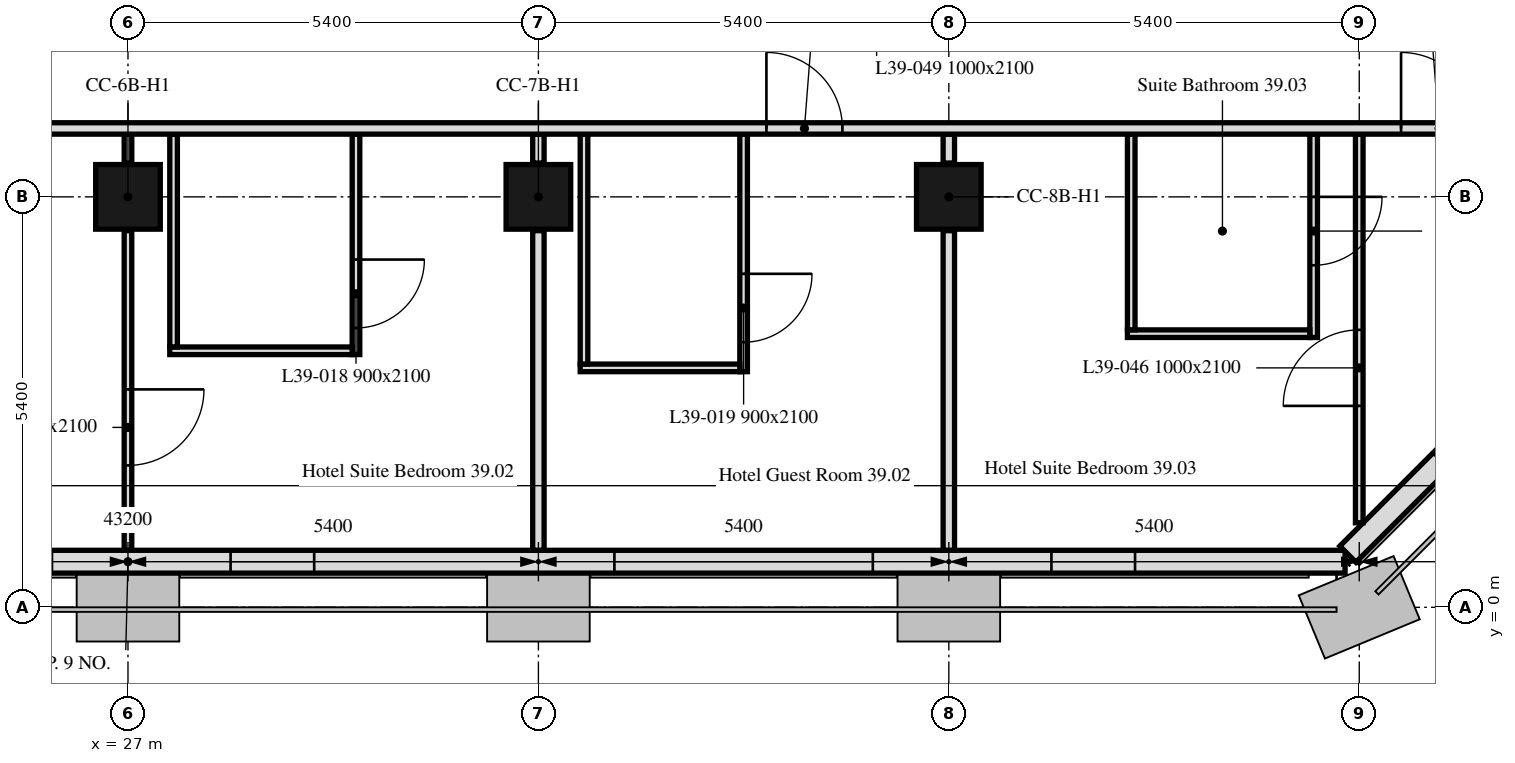
"""IFC4 building model, lengths in metres.
Left out: names, types, materials, properties, quantities, classifications, styles, units other than length and angle.
Written with IfcOpenShell. Run it as: python <this file> out.ifc"""

import sys

from ifc_helpers import new_model, si_unit, direction, frame, frame_2d, origin, origin_2d, place, context, subcontext, project, spatial, rectangle, extrude, element, fill, save


model = new_model("IFC4")
c1 = context("Model", 3, precision=1e-05, world=origin(), true_north=direction((0.0, 1.0)))
c2 = subcontext(c1, "Body", "Model", "MODEL_VIEW")
j1 = project(units=[si_unit("LENGTHUNIT", "METRE"), si_unit("PLANEANGLEUNIT", "RADIAN")], contexts=[c1])
p1 = place(None, origin())
s1 = spatial("IfcSite", under=j1, at=p1, CompositionType="ELEMENT")
p2 = place(p1, origin())
s2 = spatial("IfcBuilding", under=s1, at=p2, CompositionType="ELEMENT")
p3 = place(p2, frame((0.0, 0.0, 166.0)))
s3 = spatial("IfcBuildingStorey", under=s2, at=p3, CompositionType="ELEMENT", Elevation=166.0)
for number, where, z_axis, x_axis in (
    (1, (27.0, 5.4, 0.0), (0.0, 0.0, 1.0), (1.0, 0.0, 0.0)),
    (2, (32.4, 5.4, 0.0), (0.0, 0.0, 1.0), (1.0, 0.0, 0.0)),
    (3, (37.8, 5.4, 0.0), (0.0, 0.0, 1.0), (1.0, 0.0, 0.0)),
):
    element("IfcColumn", number, at=place(p3, frame(where, z_axis=z_axis, x_axis=x_axis)), inside=s3, PredefinedType="COLUMN", context=c2, shape_type="SweptSolid", body=[
        extrude(rectangle(XDim=0.85, YDim=0.85, at=origin_2d()), origin(), (0.0, 0.0, 1.0), 3.0),
    ])
p4 = place(p3, frame((10.986, 0.6, 0.0), z_axis=(0.0, 0.0, 1.0), x_axis=(1.0, 0.0, 0.0)))
e4 = element("IfcWall", 4, at=p4, inside=s3, PredefinedType="SOLIDWALL", context=c2, shape_type="SweptSolid", body=[
    extrude(rectangle(XDim=32.027, YDim=0.3, at=frame_2d((16.014, 0.0))), origin(), (0.0, 0.0, 1.0), 3.0),
])
p5 = place(p4, frame((0.814, 0.0, 0.9)))
e5 = element("IfcOpeningElement", 5, at=p5, cuts=e4, PredefinedType="OPENING", context=c2, shape_type="SweptSolid", body=[
    extrude(rectangle(XDim=3.4, YDim=1.7, at=frame_2d((1.7, 0.85))), frame((0.0, 0.16, 0.0), z_axis=(0.0, -1.0, 0.0), x_axis=(1.0, 0.0, 0.0)), (0.0, 0.0, 1.0), 0.32),
])
p6 = place(p4, frame((6.564, 0.0, 0.9)))
e6 = element("IfcOpeningElement", 6, at=p6, cuts=e4, PredefinedType="OPENING", context=c2, shape_type="SweptSolid", body=[
    extrude(rectangle(XDim=1.1, YDim=1.7, at=frame_2d((0.55, 0.85))), frame((0.0, 0.16, 0.0), z_axis=(0.0, -1.0, 0.0), x_axis=(1.0, 0.0, 0.0)), (0.0, 0.0, 1.0), 0.32),
])
p7 = place(p4, frame((11.614, 0.0, 0.9)))
e7 = element("IfcOpeningElement", 7, at=p7, cuts=e4, PredefinedType="OPENING", context=c2, shape_type="SweptSolid", body=[
    extrude(rectangle(XDim=3.4, YDim=1.7, at=frame_2d((1.7, 0.85))), frame((0.0, 0.16, 0.0), z_axis=(0.0, -1.0, 0.0), x_axis=(1.0, 0.0, 0.0)), (0.0, 0.0, 1.0), 0.32),
])
p8 = place(p4, frame((17.364, 0.0, 0.9)))
e8 = element("IfcOpeningElement", 8, at=p8, cuts=e4, PredefinedType="OPENING", context=c2, shape_type="SweptSolid", body=[
    extrude(rectangle(XDim=1.1, YDim=1.7, at=frame_2d((0.55, 0.85))), frame((0.0, 0.16, 0.0), z_axis=(0.0, -1.0, 0.0), x_axis=(1.0, 0.0, 0.0)), (0.0, 0.0, 1.0), 0.32),
])
p9 = place(p4, frame((22.414, 0.0, 0.9)))
e9 = element("IfcOpeningElement", 9, at=p9, cuts=e4, PredefinedType="OPENING", context=c2, shape_type="SweptSolid", body=[
    extrude(rectangle(XDim=3.4, YDim=1.7, at=frame_2d((1.7, 0.85))), frame((0.0, 0.16, 0.0), z_axis=(0.0, -1.0, 0.0), x_axis=(1.0, 0.0, 0.0)), (0.0, 0.0, 1.0), 0.32),
])
p10 = place(p4, frame((28.164, 0.0, 0.9)))
e10 = element("IfcOpeningElement", 10, at=p10, cuts=e4, PredefinedType="OPENING", context=c2, shape_type="SweptSolid", body=[
    extrude(rectangle(XDim=1.1, YDim=1.7, at=frame_2d((0.55, 0.85))), frame((0.0, 0.16, 0.0), z_axis=(0.0, -1.0, 0.0), x_axis=(1.0, 0.0, 0.0)), (0.0, 0.0, 1.0), 0.32),
])
p11 = place(p3, frame((43.051, 0.699, 0.0), z_axis=(0.0, 0.0, 1.0), x_axis=(0.707106781187, 0.707106781187, 0.0)))
e11 = element("IfcWall", 11, at=p11, inside=s3, PredefinedType="SOLIDWALL", context=c2, shape_type="SweptSolid", body=[
    extrude(rectangle(XDim=6.86, YDim=0.3, at=frame_2d((3.43, 0.0))), origin(), (0.0, 0.0, 1.0), 3.0),
])
p12 = place(p11, frame((1.73, 0.0, 0.9)))
e12 = element("IfcOpeningElement", 12, at=p12, cuts=e11, PredefinedType="OPENING", context=c2, shape_type="SweptSolid", body=[
    extrude(rectangle(XDim=3.4, YDim=1.7, at=frame_2d((1.7, 0.85))), frame((0.0, 0.16, 0.0), z_axis=(0.0, -1.0, 0.0), x_axis=(1.0, 0.0, 0.0)), (0.0, 0.0, 1.0), 0.32),
])
p13 = place(p3, frame((32.4, 0.751, 0.0), z_axis=(0.0, 0.0, 1.0), x_axis=(0.0, 1.0, 0.0)))
e13 = element("IfcWall", 13, at=p13, inside=s3, PredefinedType="PARTITIONING", context=c2, shape_type="SweptSolid", body=[
    extrude(rectangle(XDim=4.204, YDim=0.15, at=frame_2d((2.102, 0.0))), origin(), (0.0, 0.0, 1.0), 2.4),
])
p14 = place(p3, frame((32.4, 5.845, 0.0), z_axis=(0.0, 0.0, 1.0), x_axis=(0.0, 1.0, 0.0)))
e14 = element("IfcWall", 14, at=p14, inside=s3, PredefinedType="PARTITIONING", context=c2, shape_type="SweptSolid", body=[
    extrude(rectangle(XDim=0.38, YDim=0.15, at=frame_2d((0.19, 0.0))), origin(), (0.0, 0.0, 1.0), 2.4),
])
p15 = place(p3, frame((30.0, 6.225, 0.0), z_axis=(0.0, 0.0, 1.0), x_axis=(0.0, -1.0, 0.0)))
e15 = element("IfcWall", 15, at=p15, inside=s3, PredefinedType="PARTITIONING", context=c2, shape_type="SweptSolid", body=[
    extrude(rectangle(XDim=2.9, YDim=0.1, at=frame_2d((1.45, 0.0))), origin(), (0.0, 0.0, 1.0), 3.0),
])
p16 = place(p15, frame((1.65, 0.0, 0.0)))
e16 = element("IfcOpeningElement", 16, at=p16, cuts=e15, PredefinedType="OPENING", context=c2, shape_type="SweptSolid", body=[
    extrude(rectangle(XDim=0.9, YDim=2.1, at=frame_2d((0.45, 1.05))), frame((0.0, 0.05, 0.0), z_axis=(0.0, -1.0, 0.0), x_axis=(1.0, 0.0, 0.0)), (0.0, 0.0, 1.0), 0.1),
])
p17 = place(p3, frame((29.95, 3.375, 0.0), z_axis=(0.0, 0.0, 1.0), x_axis=(-1.0, 0.0, 0.0)))
e17 = element("IfcWall", 17, at=p17, inside=s3, PredefinedType="PARTITIONING", context=c2, shape_type="SweptSolid", body=[
    extrude(rectangle(XDim=2.4, YDim=0.1, at=frame_2d((1.2, 0.0))), origin(), (0.0, 0.0, 1.0), 3.0),
])
p18 = place(p3, frame((27.6, 3.425, 0.0), z_axis=(0.0, 0.0, 1.0), x_axis=(0.0, 1.0, 0.0)))
e18 = element("IfcWall", 18, at=p18, inside=s3, PredefinedType="PARTITIONING", context=c2, shape_type="SweptSolid", body=[
    extrude(rectangle(XDim=2.8, YDim=0.1, at=frame_2d((1.4, 0.0))), origin(), (0.0, 0.0, 1.0), 3.0),
])
p19 = place(p3, frame((27.0, 6.225, 0.0), z_axis=(0.0, 0.0, 1.0), x_axis=(0.0, -1.0, 0.0)))
e19 = element("IfcWall", 19, at=p19, inside=s3, PredefinedType="PARTITIONING", context=c2, shape_type="SweptSolid", body=[
    extrude(rectangle(XDim=0.38, YDim=0.1, at=frame_2d((0.19, 0.0))), origin(), (0.0, 0.0, 1.0), 2.4),
])
p20 = place(p3, frame((27.0, 4.955, 0.0), z_axis=(0.0, 0.0, 1.0), x_axis=(0.0, -1.0, 0.0)))
e20 = element("IfcWall", 20, at=p20, inside=s3, PredefinedType="PARTITIONING", context=c2, shape_type="SweptSolid", body=[
    extrude(rectangle(XDim=4.204, YDim=0.1, at=frame_2d((2.102, 0.0))), origin(), (0.0, 0.0, 1.0), 2.4),
])
p21 = place(p20, frame((2.088, 0.0, 0.0)))
e21 = element("IfcOpeningElement", 21, at=p21, cuts=e20, PredefinedType="OPENING", context=c2, shape_type="SweptSolid", body=[
    extrude(rectangle(XDim=1.0, YDim=2.1, at=frame_2d((0.5, 1.05))), frame((0.0, 0.05, 0.0), z_axis=(0.0, -1.0, 0.0), x_axis=(1.0, 0.0, 0.0)), (0.0, 0.0, 1.0), 0.1),
])
p22 = place(p3, frame((37.8, 0.751, 0.0), z_axis=(0.0, 0.0, 1.0), x_axis=(0.0, 1.0, 0.0)))
e22 = element("IfcWall", 22, at=p22, inside=s3, PredefinedType="PARTITIONING", context=c2, shape_type="SweptSolid", body=[
    extrude(rectangle(XDim=4.204, YDim=0.15, at=frame_2d((2.102, 0.0))), origin(), (0.0, 0.0, 1.0), 2.4),
])
p23 = place(p3, frame((37.8, 5.845, 0.0), z_axis=(0.0, 0.0, 1.0), x_axis=(0.0, 1.0, 0.0)))
e23 = element("IfcWall", 23, at=p23, inside=s3, PredefinedType="PARTITIONING", context=c2, shape_type="SweptSolid", body=[
    extrude(rectangle(XDim=0.38, YDim=0.15, at=frame_2d((0.19, 0.0))), origin(), (0.0, 0.0, 1.0), 2.4),
])
p24 = place(p3, frame((35.1, 6.225, 0.0), z_axis=(0.0, 0.0, 1.0), x_axis=(0.0, -1.0, 0.0)))
e24 = element("IfcWall", 24, at=p24, inside=s3, PredefinedType="PARTITIONING", context=c2, shape_type="SweptSolid", body=[
    extrude(rectangle(XDim=3.125, YDim=0.1, at=frame_2d((1.562, 0.0))), origin(), (0.0, 0.0, 1.0), 3.0),
])
p25 = place(p24, frame((1.837, 0.0, 0.0)))
e25 = element("IfcOpeningElement", 25, at=p25, cuts=e24, PredefinedType="OPENING", context=c2, shape_type="SweptSolid", body=[
    extrude(rectangle(XDim=0.9, YDim=2.1, at=frame_2d((0.45, 1.05))), frame((0.0, 0.05, 0.0), z_axis=(0.0, -1.0, 0.0), x_axis=(1.0, 0.0, 0.0)), (0.0, 0.0, 1.0), 0.1),
])
p26 = place(p3, frame((35.05, 3.15, 0.0), z_axis=(0.0, 0.0, 1.0), x_axis=(-1.0, 0.0, 0.0)))
e26 = element("IfcWall", 26, at=p26, inside=s3, PredefinedType="PARTITIONING", context=c2, shape_type="SweptSolid", body=[
    extrude(rectangle(XDim=2.1, YDim=0.1, at=frame_2d((1.05, 0.0))), origin(), (0.0, 0.0, 1.0), 3.0),
])
p27 = place(p3, frame((33.0, 3.2, 0.0), z_axis=(0.0, 0.0, 1.0), x_axis=(0.0, 1.0, 0.0)))
e27 = element("IfcWall", 27, at=p27, inside=s3, PredefinedType="PARTITIONING", context=c2, shape_type="SweptSolid", body=[
    extrude(rectangle(XDim=3.025, YDim=0.1, at=frame_2d((1.513, 0.0))), origin(), (0.0, 0.0, 1.0), 3.0),
])
p28 = place(p3, frame((43.2, 1.112, 0.0), z_axis=(0.0, 0.0, 1.0), x_axis=(0.0, 1.0, 0.0)))
e28 = element("IfcWall", 28, at=p28, inside=s3, PredefinedType="PARTITIONING", context=c2, shape_type="SweptSolid", body=[
    extrude(rectangle(XDim=5.113, YDim=0.1, at=frame_2d((2.557, 0.0))), origin(), (0.0, 0.0, 1.0), 3.0),
])
p29 = place(p28, frame((1.538, 0.0, 0.0)))
e29 = element("IfcOpeningElement", 29, at=p29, cuts=e28, PredefinedType="OPENING", context=c2, shape_type="SweptSolid", body=[
    extrude(rectangle(XDim=1.0, YDim=2.1, at=frame_2d((0.5, 1.05))), frame((0.0, 0.05, 0.0), z_axis=(0.0, -1.0, 0.0), x_axis=(1.0, 0.0, 0.0)), (0.0, 0.0, 1.0), 0.1),
])
p30 = place(p3, frame((42.6, 6.225, 0.0), z_axis=(0.0, 0.0, 1.0), x_axis=(0.0, -1.0, 0.0)))
e30 = element("IfcWall", 30, at=p30, inside=s3, PredefinedType="PARTITIONING", context=c2, shape_type="SweptSolid", body=[
    extrude(rectangle(XDim=2.675, YDim=0.1, at=frame_2d((1.337, 0.0))), origin(), (0.0, 0.0, 1.0), 3.0),
])
p31 = place(p30, frame((0.825, 0.0, 0.0)))
e31 = element("IfcOpeningElement", 31, at=p31, cuts=e30, PredefinedType="OPENING", context=c2, shape_type="SweptSolid", body=[
    extrude(rectangle(XDim=0.9, YDim=2.1, at=frame_2d((0.45, 1.05))), frame((0.0, 0.05, 0.0), z_axis=(0.0, -1.0, 0.0), x_axis=(1.0, 0.0, 0.0)), (0.0, 0.0, 1.0), 0.1),
])
p32 = place(p3, frame((42.55, 3.6, 0.0), z_axis=(0.0, 0.0, 1.0), x_axis=(-1.0, 0.0, 0.0)))
e32 = element("IfcWall", 32, at=p32, inside=s3, PredefinedType="PARTITIONING", context=c2, shape_type="SweptSolid", body=[
    extrude(rectangle(XDim=2.4, YDim=0.1, at=frame_2d((1.2, 0.0))), origin(), (0.0, 0.0, 1.0), 3.0),
])
p33 = place(p3, frame((40.2, 3.65, 0.0), z_axis=(0.0, 0.0, 1.0), x_axis=(0.0, 1.0, 0.0)))
e33 = element("IfcWall", 33, at=p33, inside=s3, PredefinedType="PARTITIONING", context=c2, shape_type="SweptSolid", body=[
    extrude(rectangle(XDim=2.575, YDim=0.1, at=frame_2d((1.288, 0.0))), origin(), (0.0, 0.0, 1.0), 3.0),
])
p34 = place(p3, frame((6.151, 6.3, 0.0), z_axis=(0.0, 0.0, 1.0), x_axis=(1.0, 0.0, 0.0)))
e34 = element("IfcWall", 34, at=p34, inside=s3, PredefinedType="PARTITIONING", context=c2, shape_type="SweptSolid", body=[
    extrude(rectangle(XDim=41.698, YDim=0.15, at=frame_2d((20.849, 0.0))), origin(), (0.0, 0.0, 1.0), 2.4),
])
p35 = place(p34, frame((1.132, 0.0, 0.0)))
e35 = element("IfcOpeningElement", 35, at=p35, cuts=e34, PredefinedType="OPENING", context=c2, shape_type="SweptSolid", body=[
    extrude(rectangle(XDim=1.0, YDim=2.1, at=frame_2d((0.5, 1.05))), frame((0.0, 0.075, 0.0), z_axis=(0.0, -1.0, 0.0), x_axis=(1.0, 0.0, 0.0)), (0.0, 0.0, 1.0), 0.15),
])
p36 = place(p34, frame((13.049, 0.0, 0.0)))
e36 = element("IfcOpeningElement", 36, at=p36, cuts=e34, PredefinedType="OPENING", context=c2, shape_type="SweptSolid", body=[
    extrude(rectangle(XDim=1.0, YDim=2.1, at=frame_2d((0.5, 1.05))), frame((0.0, 0.075, 0.0), z_axis=(0.0, -1.0, 0.0), x_axis=(1.0, 0.0, 0.0)), (0.0, 0.0, 1.0), 0.15),
])
p37 = place(p34, frame((17.649, 0.0, 0.0)))
e37 = element("IfcOpeningElement", 37, at=p37, cuts=e34, PredefinedType="OPENING", context=c2, shape_type="SweptSolid", body=[
    extrude(rectangle(XDim=1.0, YDim=2.1, at=frame_2d((0.5, 1.05))), frame((0.0, 0.075, 0.0), z_axis=(0.0, -1.0, 0.0), x_axis=(1.0, 0.0, 0.0)), (0.0, 0.0, 1.0), 0.15),
])
p38 = place(p34, frame((29.249, 0.0, 0.0)))
e38 = element("IfcOpeningElement", 38, at=p38, cuts=e34, PredefinedType="OPENING", context=c2, shape_type="SweptSolid", body=[
    extrude(rectangle(XDim=1.0, YDim=2.1, at=frame_2d((0.5, 1.05))), frame((0.0, 0.075, 0.0), z_axis=(0.0, -1.0, 0.0), x_axis=(1.0, 0.0, 0.0)), (0.0, 0.0, 1.0), 0.15),
])
p39 = place(p34, frame((37.599, 0.0, 0.0)))
e39 = element("IfcOpeningElement", 39, at=p39, cuts=e34, PredefinedType="OPENING", context=c2, shape_type="SweptSolid", body=[
    extrude(rectangle(XDim=1.0, YDim=2.1, at=frame_2d((0.5, 1.05))), frame((0.0, 0.075, 0.0), z_axis=(0.0, -1.0, 0.0), x_axis=(1.0, 0.0, 0.0)), (0.0, 0.0, 1.0), 0.15),
])
p40 = place(p8, origin())
e40 = element("IfcWindow", 40, at=p40, inside=s3, PartitioningType="SINGLE_PANEL", PredefinedType="WINDOW", context=c2, shape_type="SweptSolid", body=[
    extrude(rectangle(XDim=1.1, YDim=1.7, at=frame_2d((0.55, 0.85))), frame((0.0, 0.03, 0.0), z_axis=(0.0, -1.0, 0.0), x_axis=(1.0, 0.0, 0.0)), (0.0, 0.0, 1.0), 0.06),
])
fill(e8, e40)
p41 = place(p9, origin())
e41 = element("IfcWindow", 41, at=p41, inside=s3, PartitioningType="SINGLE_PANEL", PredefinedType="WINDOW", context=c2, shape_type="SweptSolid", body=[
    extrude(rectangle(XDim=3.4, YDim=1.7, at=frame_2d((1.7, 0.85))), frame((0.0, 0.03, 0.0), z_axis=(0.0, -1.0, 0.0), x_axis=(1.0, 0.0, 0.0)), (0.0, 0.0, 1.0), 0.06),
])
fill(e9, e41)
p42 = place(p10, origin())
e42 = element("IfcWindow", 42, at=p42, inside=s3, PartitioningType="SINGLE_PANEL", PredefinedType="WINDOW", context=c2, shape_type="SweptSolid", body=[
    extrude(rectangle(XDim=1.1, YDim=1.7, at=frame_2d((0.55, 0.85))), frame((0.0, 0.03, 0.0), z_axis=(0.0, -1.0, 0.0), x_axis=(1.0, 0.0, 0.0)), (0.0, 0.0, 1.0), 0.06),
])
fill(e10, e42)
p43 = place(p16, origin())
e43 = element("IfcDoor", 43, at=p43, inside=s3, OperationType="SINGLE_SWING_LEFT", PredefinedType="DOOR", context=c2, shape_type="SweptSolid", body=[
    extrude(rectangle(XDim=0.9, YDim=2.1, at=frame_2d((0.45, 1.05))), frame((0.0, 0.025, 0.0), z_axis=(0.0, -1.0, 0.0), x_axis=(1.0, 0.0, 0.0)), (0.0, 0.0, 1.0), 0.05),
])
fill(e16, e43)
p44 = place(p25, origin())
e44 = element("IfcDoor", 44, at=p44, inside=s3, OperationType="SINGLE_SWING_LEFT", PredefinedType="DOOR", context=c2, shape_type="SweptSolid", body=[
    extrude(rectangle(XDim=0.9, YDim=2.1, at=frame_2d((0.45, 1.05))), frame((0.0, 0.025, 0.0), z_axis=(0.0, -1.0, 0.0), x_axis=(1.0, 0.0, 0.0)), (0.0, 0.0, 1.0), 0.05),
])
fill(e25, e44)
p45 = place(p31, origin())
e45 = element("IfcDoor", 45, at=p45, inside=s3, OperationType="SINGLE_SWING_RIGHT", PredefinedType="DOOR", context=c2, shape_type="SweptSolid", body=[
    extrude(rectangle(XDim=0.9, YDim=2.1, at=frame_2d((0.45, 1.05))), frame((0.0, 0.025, 0.0), z_axis=(0.0, -1.0, 0.0), x_axis=(1.0, 0.0, 0.0)), (0.0, 0.0, 1.0), 0.05),
])
fill(e31, e45)
p46 = place(p21, origin())
e46 = element("IfcDoor", 46, at=p46, inside=s3, OperationType="SINGLE_SWING_LEFT", PredefinedType="DOOR", context=c2, shape_type="SweptSolid", body=[
    extrude(rectangle(XDim=1.0, YDim=2.1, at=frame_2d((0.5, 1.05))), frame((0.0, 0.025, 0.0), z_axis=(0.0, -1.0, 0.0), x_axis=(1.0, 0.0, 0.0)), (0.0, 0.0, 1.0), 0.05),
])
fill(e21, e46)
p47 = place(p38, origin())
e47 = element("IfcDoor", 47, at=p47, inside=s3, OperationType="SINGLE_SWING_RIGHT", PredefinedType="DOOR", context=c2, shape_type="SweptSolid", body=[
    extrude(rectangle(XDim=1.0, YDim=2.1, at=frame_2d((0.5, 1.05))), frame((0.0, 0.025, 0.0), z_axis=(0.0, -1.0, 0.0), x_axis=(1.0, 0.0, 0.0)), (0.0, 0.0, 1.0), 0.05),
])
fill(e38, e47)
p48 = place(p29, origin())
e48 = element("IfcDoor", 48, at=p48, inside=s3, OperationType="SINGLE_SWING_RIGHT", PredefinedType="DOOR", context=c2, shape_type="SweptSolid", body=[
    extrude(rectangle(XDim=1.0, YDim=2.1, at=frame_2d((0.5, 1.05))), frame((0.0, 0.025, 0.0), z_axis=(0.0, -1.0, 0.0), x_axis=(1.0, 0.0, 0.0)), (0.0, 0.0, 1.0), 0.05),
])
fill(e29, e48)
p49 = place(p39, origin())
e49 = element("IfcDoor", 49, at=p49, inside=s3, OperationType="SINGLE_SWING_LEFT", PredefinedType="DOOR", context=c2, shape_type="SweptSolid", body=[
    extrude(rectangle(XDim=1.0, YDim=2.1, at=frame_2d((0.5, 1.05))), frame((0.0, 0.025, 0.0), z_axis=(0.0, -1.0, 0.0), x_axis=(1.0, 0.0, 0.0)), (0.0, 0.0, 1.0), 0.05),
])
fill(e39, e49)
save(model, sys.argv[1])
